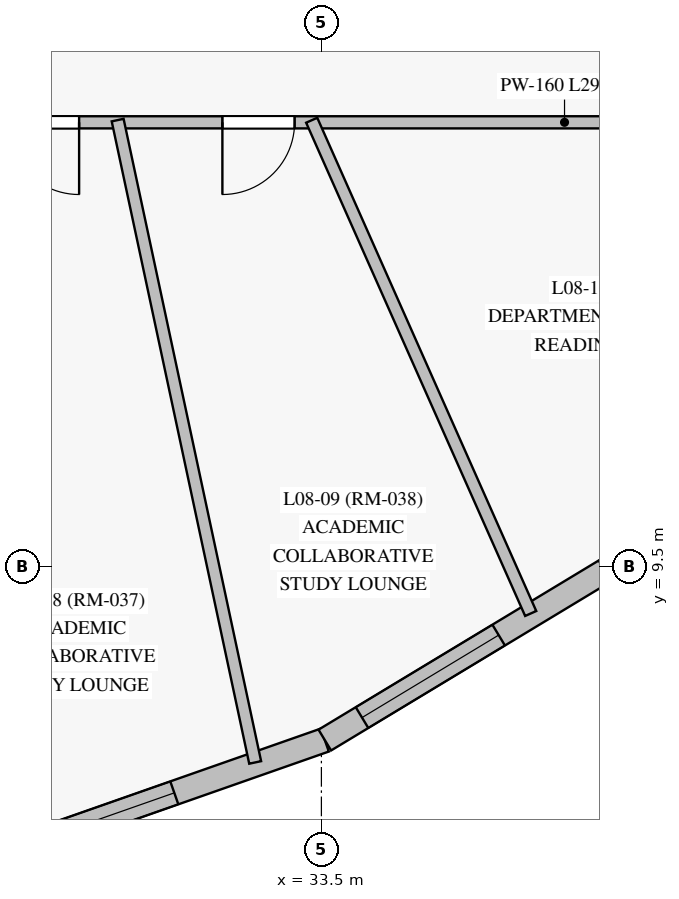
"""IFC4 building model, lengths in metres.
Left out: names, types, materials, properties, quantities, classifications, styles, units other than length and angle.
Written with IfcOpenShell. Run it as: python <this file> out.ifc"""

import sys

from ifc_helpers import new_model, si_unit, direction, frame, frame_2d, origin, origin_with_axes, place, context, subcontext, project, spatial, rectangle, extrude, source, transform, mapped, element, fill, save


model = new_model("IFC4")
c1 = context("Model", 3, precision=1e-05, world=origin(), true_north=direction((0.0, 1.0)))
c2 = subcontext(c1, "Body", "Model", "MODEL_VIEW")
j1 = project(units=[si_unit("LENGTHUNIT", "METRE"), si_unit("PLANEANGLEUNIT", "RADIAN")], contexts=[c1])
p1 = place(None, origin())
s1 = spatial("IfcSite", under=j1, at=p1, CompositionType="ELEMENT")
p2 = place(p1, origin())
s2 = spatial("IfcBuilding", under=s1, at=p2, CompositionType="ELEMENT")
p3 = place(p2, frame((0.0, 0.0, 33.7)))
s3 = spatial("IfcBuildingStorey", under=s2, at=p3, CompositionType="ELEMENT", Elevation=33.7)
p4 = place(p3, frame((18.228, 1.85, 0.0), z_axis=(0.0, 0.0, 1.0), x_axis=(0.943633034102, 0.330993499864, 0.0)))
e1 = element("IfcWall", 1, at=p4, inside=s3, PredefinedType="SOLIDWALL", context=c2, shape_type="SweptSolid", body=[
    extrude(rectangle(XDim=16.232, YDim=0.32, at=frame_2d((8.116, 0.0))), origin(), (0.0, 0.0, 1.0), 3.35),
])
p5 = place(p4, frame((0.685, 0.0, 0.85)))
e2 = element("IfcOpeningElement", 2, at=p5, cuts=e1, PredefinedType="OPENING", context=c2, shape_type="SweptSolid", body=[
    extrude(rectangle(XDim=2.1, YDim=1.95, at=frame_2d((1.05, 0.975))), frame((0.0, 0.17, 0.0), z_axis=(0.0, -1.0, 0.0), x_axis=(1.0, 0.0, 0.0)), (0.0, 0.0, 1.0), 0.34),
])
p6 = place(p4, frame((4.551, 0.0, 0.85)))
e3 = element("IfcOpeningElement", 3, at=p6, cuts=e1, PredefinedType="OPENING", context=c2, shape_type="SweptSolid", body=[
    extrude(rectangle(XDim=2.1, YDim=1.95, at=frame_2d((1.05, 0.975))), frame((0.0, 0.17, 0.0), z_axis=(0.0, -1.0, 0.0), x_axis=(1.0, 0.0, 0.0)), (0.0, 0.0, 1.0), 0.34),
])
p7 = place(p4, frame((8.292, 0.0, 0.85)))
e4 = element("IfcOpeningElement", 4, at=p7, cuts=e1, PredefinedType="OPENING", context=c2, shape_type="SweptSolid", body=[
    extrude(rectangle(XDim=2.1, YDim=1.95, at=frame_2d((1.05, 0.975))), frame((0.0, 0.17, 0.0), z_axis=(0.0, -1.0, 0.0), x_axis=(1.0, 0.0, 0.0)), (0.0, 0.0, 1.0), 0.34),
])
p8 = place(p4, frame((12.034, 0.0, 0.85)))
e5 = element("IfcOpeningElement", 5, at=p8, cuts=e1, PredefinedType="OPENING", context=c2, shape_type="SweptSolid", body=[
    extrude(rectangle(XDim=2.1, YDim=1.95, at=frame_2d((1.05, 0.975))), frame((0.0, 0.17, 0.0), z_axis=(0.0, -1.0, 0.0), x_axis=(1.0, 0.0, 0.0)), (0.0, 0.0, 1.0), 0.34),
])
p9 = place(p3, frame((33.545, 7.223, 0.0), z_axis=(0.0, 0.0, 1.0), x_axis=(0.8560794316, 0.51684427712, 0.0)))
e6 = element("IfcWall", 6, at=p9, inside=s3, PredefinedType="SOLIDWALL", context=c2, shape_type="SweptSolid", body=[
    extrude(rectangle(XDim=11.288, YDim=0.32, at=frame_2d((5.644, 0.0))), origin(), (0.0, 0.0, 1.0), 3.35),
])
p10 = place(p9, frame((0.572, 0.0, 0.85)))
e7 = element("IfcOpeningElement", 7, at=p10, cuts=e6, PredefinedType="OPENING", context=c2, shape_type="SweptSolid", body=[
    extrude(rectangle(XDim=2.1, YDim=1.95, at=frame_2d((1.05, 0.975))), frame((0.0, 0.17, 0.0), z_axis=(0.0, -1.0, 0.0), x_axis=(1.0, 0.0, 0.0)), (0.0, 0.0, 1.0), 0.34),
])
p11 = place(p9, frame((4.305, 0.0, 0.85)))
e8 = element("IfcOpeningElement", 8, at=p11, cuts=e6, PredefinedType="OPENING", context=c2, shape_type="SweptSolid", body=[
    extrude(rectangle(XDim=2.1, YDim=1.95, at=frame_2d((1.05, 0.975))), frame((0.0, 0.17, 0.0), z_axis=(0.0, -1.0, 0.0), x_axis=(1.0, 0.0, 0.0)), (0.0, 0.0, 1.0), 0.34),
])
p12 = place(p9, frame((8.007, 0.0, 0.85)))
e9 = element("IfcOpeningElement", 9, at=p12, cuts=e6, PredefinedType="OPENING", context=c2, shape_type="SweptSolid", body=[
    extrude(rectangle(XDim=2.1, YDim=1.95, at=frame_2d((1.05, 0.975))), frame((0.0, 0.17, 0.0), z_axis=(0.0, -1.0, 0.0), x_axis=(1.0, 0.0, 0.0)), (0.0, 0.0, 1.0), 0.34),
])
p13 = place(p3, frame((40.25, 15.35, 0.0), z_axis=(0.0, 0.0, 1.0), x_axis=(-1.0, 0.0, 0.0)))
e10 = element("IfcWall", 10, at=p13, inside=s3, PredefinedType="PARTITIONING", context=c2, shape_type="SweptSolid", body=[
    extrude(rectangle(XDim=29.75, YDim=0.16, at=frame_2d((14.875, 0.0))), origin(), (0.0, 0.0, 1.0), 2.7),
])
p14 = place(p13, frame((25.925, 0.0, 0.0)))
e11 = element("IfcOpeningElement", 11, at=p14, cuts=e10, PredefinedType="OPENING", context=c2, shape_type="SweptSolid", body=[
    extrude(rectangle(XDim=0.95, YDim=2.15, at=frame_2d((0.475, 1.075))), frame((0.0, 0.09, 0.0), z_axis=(0.0, -1.0, 0.0), x_axis=(1.0, 0.0, 0.0)), (0.0, 0.0, 1.0), 0.18),
])
p15 = place(p13, frame((21.748, 0.0, 0.0)))
e12 = element("IfcOpeningElement", 12, at=p15, cuts=e10, PredefinedType="OPENING", context=c2, shape_type="SweptSolid", body=[
    extrude(rectangle(XDim=0.95, YDim=2.15, at=frame_2d((0.475, 1.075))), frame((0.0, 0.09, 0.0), z_axis=(0.0, -1.0, 0.0), x_axis=(1.0, 0.0, 0.0)), (0.0, 0.0, 1.0), 0.18),
])
p16 = place(p13, frame((18.423, 0.0, 0.0)))
e13 = element("IfcOpeningElement", 13, at=p16, cuts=e10, PredefinedType="OPENING", context=c2, shape_type="SweptSolid", body=[
    extrude(rectangle(XDim=0.95, YDim=2.15, at=frame_2d((0.475, 1.075))), frame((0.0, 0.09, 0.0), z_axis=(0.0, -1.0, 0.0), x_axis=(1.0, 0.0, 0.0)), (0.0, 0.0, 1.0), 0.18),
])
p17 = place(p13, frame((15.67, 0.0, 0.0)))
e14 = element("IfcOpeningElement", 14, at=p17, cuts=e10, PredefinedType="OPENING", context=c2, shape_type="SweptSolid", body=[
    extrude(rectangle(XDim=0.95, YDim=2.15, at=frame_2d((0.475, 1.075))), frame((0.0, 0.09, 0.0), z_axis=(0.0, -1.0, 0.0), x_axis=(1.0, 0.0, 0.0)), (0.0, 0.0, 1.0), 0.18),
])
p18 = place(p13, frame((13.96, 0.0, 0.0)))
e15 = element("IfcOpeningElement", 15, at=p18, cuts=e10, PredefinedType="OPENING", context=c2, shape_type="SweptSolid", body=[
    extrude(rectangle(XDim=0.95, YDim=2.15, at=frame_2d((0.475, 1.075))), frame((0.0, 0.09, 0.0), z_axis=(0.0, -1.0, 0.0), x_axis=(1.0, 0.0, 0.0)), (0.0, 0.0, 1.0), 0.18),
])
p19 = place(p13, frame((9.938, 0.0, 0.0)))
e16 = element("IfcOpeningElement", 16, at=p19, cuts=e10, PredefinedType="OPENING", context=c2, shape_type="SweptSolid", body=[
    extrude(rectangle(XDim=0.95, YDim=2.15, at=frame_2d((0.475, 1.075))), frame((0.0, 0.09, 0.0), z_axis=(0.0, -1.0, 0.0), x_axis=(1.0, 0.0, 0.0)), (0.0, 0.0, 1.0), 0.18),
])
p20 = place(p13, frame((7.103, 0.0, 0.0)))
e17 = element("IfcOpeningElement", 17, at=p20, cuts=e10, PredefinedType="OPENING", context=c2, shape_type="SweptSolid", body=[
    extrude(rectangle(XDim=0.95, YDim=2.15, at=frame_2d((0.475, 1.075))), frame((0.0, 0.09, 0.0), z_axis=(0.0, -1.0, 0.0), x_axis=(1.0, 0.0, 0.0)), (0.0, 0.0, 1.0), 0.18),
])
p21 = place(p3, frame((30.82, 15.379, 0.0), z_axis=(0.0, 0.0, 1.0), x_axis=(0.20933229931, -0.977844562528, 0.0)))
e18 = element("IfcWall", 18, at=p21, inside=s3, PredefinedType="PARTITIONING", context=c2, shape_type="SweptSolid", body=[
    extrude(rectangle(XDim=8.642, YDim=0.16, at=frame_2d((4.321, 0.0))), origin(), (0.0, 0.0, 1.0), 3.35),
])
p22 = place(p3, frame((33.373, 15.377, 0.0), z_axis=(0.0, 0.0, 1.0), x_axis=(0.40578429947, -0.913968873816, 0.0)))
e19 = element("IfcWall", 19, at=p22, inside=s3, PredefinedType="PARTITIONING", context=c2, shape_type="SweptSolid", body=[
    extrude(rectangle(XDim=7.1, YDim=0.16, at=frame_2d((3.55, 0.0))), origin(), (0.0, 0.0, 1.0), 3.35),
])
m1 = source(origin_with_axes(), c2, "Body", "SweptSolid", [
    extrude(rectangle(XDim=2.1, YDim=1.95, at=frame_2d((1.05, 0.975))), frame((0.0, 0.03, 0.0), z_axis=(0.0, -1.0, 0.0), x_axis=(1.0, 0.0, 0.0)), (0.0, 0.0, 1.0), 0.06),
])
p23 = place(p8, origin())
e20 = element("IfcWindow", 20, at=p23, inside=s3, PartitioningType="SINGLE_PANEL", PredefinedType="WINDOW", context=c2, shape_type="MappedRepresentation", body=[
    mapped(m1, transform((0.0, 0.0, 0.0), scale=1.0)),
])
fill(e5, e20)
p24 = place(p10, origin())
e21 = element("IfcWindow", 21, at=p24, inside=s3, PartitioningType="SINGLE_PANEL", PredefinedType="WINDOW", context=c2, shape_type="MappedRepresentation", body=[
    mapped(m1, transform((0.0, 0.0, 0.0), scale=1.0)),
])
fill(e7, e21)
m2 = source(origin_with_axes(), c2, "Body", "SweptSolid", [
    extrude(rectangle(XDim=0.95, YDim=2.15, at=frame_2d((0.475, 1.075))), frame((0.0, 0.025, 0.0), z_axis=(0.0, -1.0, 0.0), x_axis=(1.0, 0.0, 0.0)), (0.0, 0.0, 1.0), 0.05),
])
p25 = place(p19, origin())
e22 = element("IfcDoor", 22, at=p25, inside=s3, OperationType="SINGLE_SWING_LEFT", PredefinedType="DOOR", context=c2, shape_type="MappedRepresentation", body=[
    mapped(m2, transform((0.0, 0.0, 0.0), scale=1.0)),
])
fill(e16, e22)
p26 = place(p20, origin())
e23 = element("IfcDoor", 23, at=p26, inside=s3, OperationType="SINGLE_SWING_RIGHT", PredefinedType="DOOR", context=c2, shape_type="MappedRepresentation", body=[
    mapped(m2, transform((0.0, 0.0, 0.0), scale=1.0)),
])
fill(e17, e23)
save(model, sys.argv[1])
